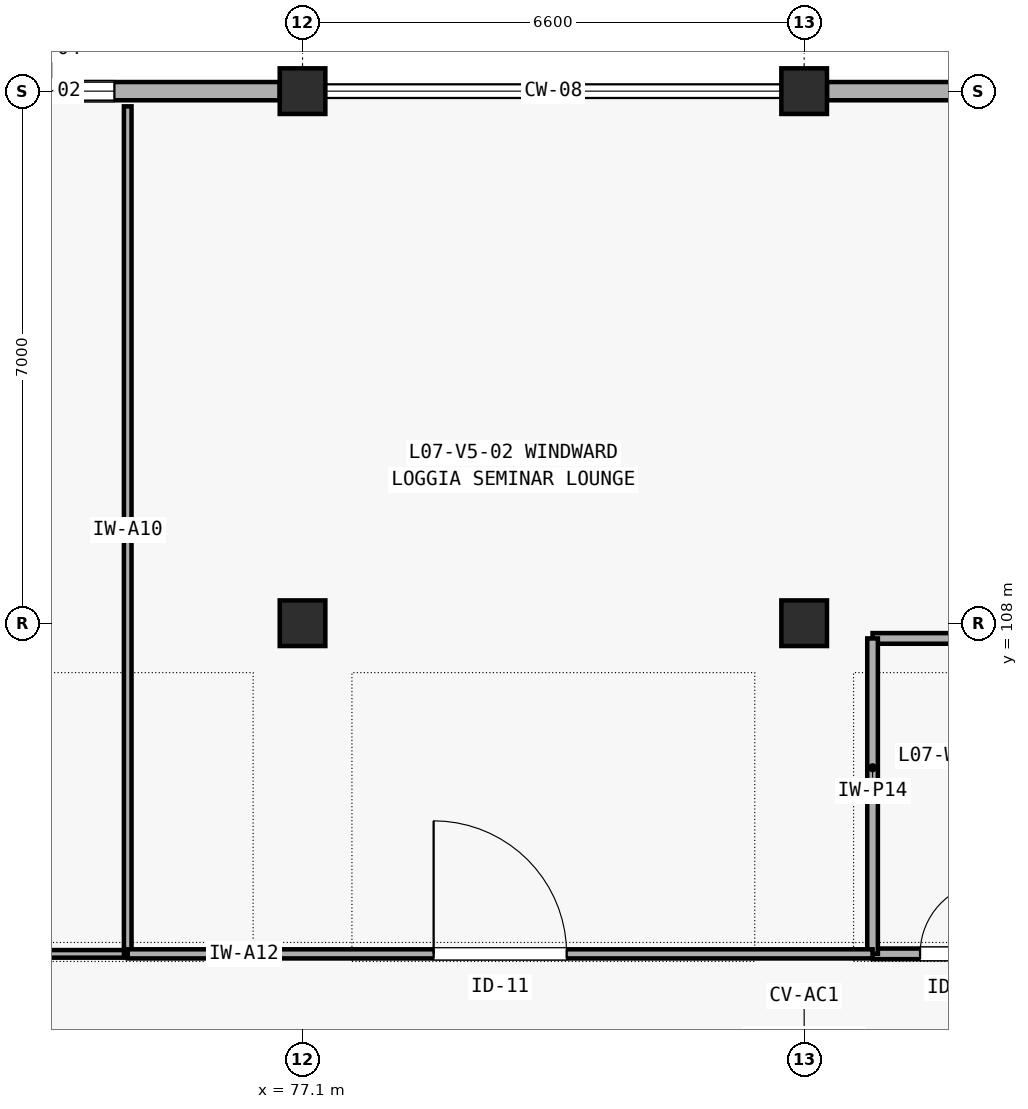
"""IFC4 building model, lengths in metres.
Left out: names, types, materials, properties, quantities, classifications, styles, units other than length and angle.
Written with IfcOpenShell. Run it as: python <this file> out.ifc"""

import sys

from ifc_helpers import new_model, si_unit, direction, frame, frame_2d, origin, origin_2d, place, context, subcontext, project, spatial, rectangle, extrude, element, fill, save


model = new_model("IFC4")
c1 = context("Model", 3, precision=1e-05, world=origin(), true_north=direction((0.0, 1.0)))
c2 = subcontext(c1, "Body", "Model", "MODEL_VIEW")
j1 = project(units=[si_unit("LENGTHUNIT", "METRE"), si_unit("PLANEANGLEUNIT", "RADIAN")], contexts=[c1])
p1 = place(None, origin())
s1 = spatial("IfcSite", under=j1, at=p1, CompositionType="ELEMENT")
p2 = place(p1, origin())
s2 = spatial("IfcBuilding", under=s1, at=p2, CompositionType="ELEMENT")
p3 = place(p2, frame((0.0, 0.0, 29.4)))
s3 = spatial("IfcBuildingStorey", under=s2, at=p3, CompositionType="ELEMENT", Elevation=29.4)
for number, where, z_axis, x_axis in (
    (1, (77.1, 108.0, 0.0), (0.0, 0.0, 1.0), (1.0, 0.0, 0.0)),
    (2, (77.1, 115.0, 0.0), (0.0, 0.0, 1.0), (1.0, 0.0, 0.0)),
    (3, (83.7, 108.0, 0.0), (0.0, 0.0, 1.0), (1.0, 0.0, 0.0)),
    (4, (83.7, 115.0, 0.0), (0.0, 0.0, 1.0), (1.0, 0.0, 0.0)),
):
    element("IfcColumn", number, at=place(p3, frame(where, z_axis=z_axis, x_axis=x_axis)), inside=s3, PredefinedType="COLUMN", context=c2, shape_type="SweptSolid", body=[
        extrude(rectangle(XDim=0.6, YDim=0.6, at=origin_2d()), origin(), (0.0, 0.0, 1.0), 4.2),
    ])
p4 = place(p3, frame((70.8, 115.0, 0.0), z_axis=(0.0, 0.0, 1.0), x_axis=(1.0, 0.0, 0.0)))
e5 = element("IfcWall", 5, at=p4, inside=s3, PredefinedType="SOLIDWALL", context=c2, shape_type="SweptSolid", body=[
    extrude(rectangle(XDim=6.0, YDim=0.24, at=frame_2d((3.0, 0.0))), origin(), (0.0, 0.0, 1.0), 3.135),
])
p5 = place(p4, frame((2.175, 0.0, 0.85)))
e6 = element("IfcOpeningElement", 6, at=p5, cuts=e5, PredefinedType="OPENING", context=c2, shape_type="SweptSolid", body=[
    extrude(rectangle(XDim=1.65, YDim=1.35, at=frame_2d((0.825, 0.675))), frame((0.0, 0.13, 0.0), z_axis=(0.0, -1.0, 0.0), x_axis=(1.0, 0.0, 0.0)), (0.0, 0.0, 1.0), 0.26),
])
p6 = place(p3, frame((84.0, 115.0, 0.0), z_axis=(0.0, 0.0, 1.0), x_axis=(1.0, 0.0, 0.0)))
e7 = element("IfcWall", 7, at=p6, inside=s3, PredefinedType="SOLIDWALL", context=c2, shape_type="SweptSolid", body=[
    extrude(rectangle(XDim=6.0, YDim=0.24, at=frame_2d((3.0, 0.0))), origin(), (0.0, 0.0, 1.0), 3.285),
])
p7 = place(p6, frame((1.8, 0.0, 0.85)))
e8 = element("IfcOpeningElement", 8, at=p7, cuts=e7, PredefinedType="OPENING", context=c2, shape_type="SweptSolid", body=[
    extrude(rectangle(XDim=2.4, YDim=1.35, at=frame_2d((1.2, 0.675))), frame((0.0, 0.13, 0.0), z_axis=(0.0, -1.0, 0.0), x_axis=(1.0, 0.0, 0.0)), (0.0, 0.0, 1.0), 0.26),
])
p8 = place(p3, frame((84.6, 103.65, 0.0), z_axis=(0.0, 0.0, 1.0), x_axis=(1.0, 0.0, 0.0)))
e9 = element("IfcWall", 9, at=p8, inside=s3, PredefinedType="PLUMBINGWALL", context=c2, shape_type="SweptSolid", body=[
    extrude(rectangle(XDim=2.2, YDim=0.14, at=frame_2d((1.1, 0.0))), origin(), (0.0, 0.0, 1.0), 3.9),
])
p9 = place(p8, frame((0.625, 0.0, 0.0)))
e10 = element("IfcOpeningElement", 10, at=p9, cuts=e9, PredefinedType="OPENING", context=c2, shape_type="SweptSolid", body=[
    extrude(rectangle(XDim=0.95, YDim=2.1, at=frame_2d((0.475, 1.05))), frame((0.0, 0.08, 0.0), z_axis=(0.0, -1.0, 0.0), x_axis=(1.0, 0.0, 0.0)), (0.0, 0.0, 1.0), 0.16),
])
p10 = place(p3, frame((84.6, 107.8, 0.0), z_axis=(0.0, 0.0, 1.0), x_axis=(1.0, 0.0, 0.0)))
e11 = element("IfcWall", 11, at=p10, inside=s3, PredefinedType="PLUMBINGWALL", context=c2, shape_type="SweptSolid", body=[
    extrude(rectangle(XDim=2.2, YDim=0.14, at=frame_2d((1.1, 0.0))), origin(), (0.0, 0.0, 1.0), 3.285),
])
p11 = place(p3, frame((84.6, 103.65, 0.0), z_axis=(0.0, 0.0, 1.0), x_axis=(0.0, 1.0, 0.0)))
e12 = element("IfcWall", 12, at=p11, inside=s3, PredefinedType="PLUMBINGWALL", context=c2, shape_type="SweptSolid", body=[
    extrude(rectangle(XDim=4.15, YDim=0.14, at=frame_2d((2.075, 0.0))), origin(), (0.0, 0.0, 1.0), 3.9),
])
p12 = place(p3, frame((64.1, 103.65, 0.0), z_axis=(0.0, 0.0, 1.0), x_axis=(1.0, 0.0, 0.0)))
e13 = element("IfcWall", 13, at=p12, inside=s3, PredefinedType="PARTITIONING", context=c2, shape_type="SweptSolid", body=[
    extrude(rectangle(XDim=10.7, YDim=0.1, at=frame_2d((5.35, 0.0))), origin(), (0.0, 0.0, 1.0), 3.9),
])
p13 = place(p12, frame((4.525, 0.0, 0.0)))
e14 = element("IfcOpeningElement", 14, at=p13, cuts=e13, PredefinedType="OPENING", context=c2, shape_type="SweptSolid", body=[
    extrude(rectangle(XDim=1.65, YDim=2.25, at=frame_2d((0.825, 1.125))), frame((0.0, 0.06, 0.0), z_axis=(0.0, -1.0, 0.0), x_axis=(1.0, 0.0, 0.0)), (0.0, 0.0, 1.0), 0.12),
])
p14 = place(p3, frame((74.8, 103.65, 0.0), z_axis=(0.0, 0.0, 1.0), x_axis=(0.0, 1.0, 0.0)))
e15 = element("IfcWall", 15, at=p14, inside=s3, PredefinedType="PARTITIONING", context=c2, shape_type="SweptSolid", body=[
    extrude(rectangle(XDim=11.15, YDim=0.1, at=frame_2d((5.575, 0.0))), origin(), (0.0, 0.0, 1.0), 3.582),
])
p15 = place(p3, frame((74.8, 103.65, 0.0), z_axis=(0.0, 0.0, 1.0), x_axis=(1.0, 0.0, 0.0)))
e16 = element("IfcWall", 16, at=p15, inside=s3, PredefinedType="PARTITIONING", context=c2, shape_type="SweptSolid", body=[
    extrude(rectangle(XDim=9.8, YDim=0.12, at=frame_2d((4.9, 0.0))), origin(), (0.0, 0.0, 1.0), 3.9),
])
p16 = place(p15, frame((4.025, 0.0, 0.0)))
e17 = element("IfcOpeningElement", 17, at=p16, cuts=e16, PredefinedType="OPENING", context=c2, shape_type="SweptSolid", body=[
    extrude(rectangle(XDim=1.75, YDim=2.25, at=frame_2d((0.875, 1.125))), frame((0.0, 0.07, 0.0), z_axis=(0.0, -1.0, 0.0), x_axis=(1.0, 0.0, 0.0)), (0.0, 0.0, 1.0), 0.14),
])
p17 = place(p5, origin())
e18 = element("IfcWindow", 18, at=p17, inside=s3, PartitioningType="SINGLE_PANEL", PredefinedType="WINDOW", context=c2, shape_type="SweptSolid", body=[
    extrude(rectangle(XDim=1.65, YDim=1.35, at=frame_2d((0.825, 0.675))), frame((0.0, 0.03, 0.0), z_axis=(0.0, -1.0, 0.0), x_axis=(1.0, 0.0, 0.0)), (0.0, 0.0, 1.0), 0.06),
])
fill(e6, e18)
p18 = place(p9, origin())
e19 = element("IfcDoor", 19, at=p18, inside=s3, OperationType="SINGLE_SWING_RIGHT", PredefinedType="DOOR", context=c2, shape_type="SweptSolid", body=[
    extrude(rectangle(XDim=0.95, YDim=2.1, at=frame_2d((0.475, 1.05))), frame((0.0, 0.025, 0.0), z_axis=(0.0, -1.0, 0.0), x_axis=(1.0, 0.0, 0.0)), (0.0, 0.0, 1.0), 0.05),
])
fill(e10, e19)
p19 = place(p16, origin())
e20 = element("IfcDoor", 20, at=p19, inside=s3, OperationType="SINGLE_SWING_LEFT", PredefinedType="DOOR", context=c2, shape_type="SweptSolid", body=[
    extrude(rectangle(XDim=1.75, YDim=2.25, at=frame_2d((0.875, 1.125))), frame((0.0, 0.025, 0.0), z_axis=(0.0, -1.0, 0.0), x_axis=(1.0, 0.0, 0.0)), (0.0, 0.0, 1.0), 0.05),
])
fill(e17, e20)
save(model, sys.argv[1])
